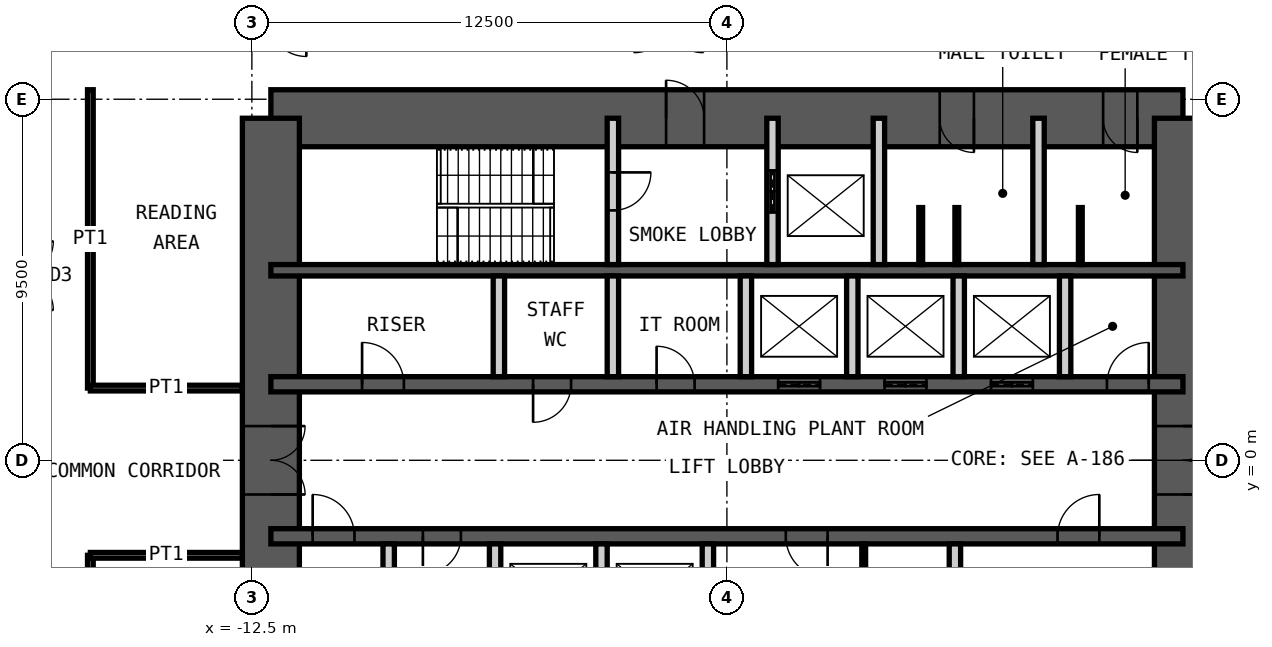
"""IFC4 building model, lengths in metres.
Left out: names, types, materials, properties, quantities, classifications, styles, units other than length and angle.
Written with IfcOpenShell. Run it as: python <this file> out.ifc"""

import sys

from ifc_helpers import new_model, si_unit, direction, frame, frame_2d, origin, place, context, subcontext, project, spatial, rectangle, extrude, element, fill, save


model = new_model("IFC4")
c1 = context("Model", 3, precision=1e-05, world=origin(), true_north=direction((0.0, 1.0)))
c2 = subcontext(c1, "Body", "Model", "MODEL_VIEW")
j1 = project(units=[si_unit("LENGTHUNIT", "METRE"), si_unit("PLANEANGLEUNIT", "RADIAN")], contexts=[c1])
p1 = place(None, origin())
s1 = spatial("IfcSite", under=j1, at=p1, CompositionType="ELEMENT")
p2 = place(p1, origin())
s2 = spatial("IfcBuilding", under=s1, at=p2, CompositionType="ELEMENT")
p3 = place(p2, frame((0.0, 0.0, 119.8)))
s3 = spatial("IfcBuildingStorey", under=s2, at=p3, CompositionType="ELEMENT", Elevation=119.8)
p4 = place(p3, frame((-12.0, 9.0, 0.0), z_axis=(0.0, 0.0, 1.0), x_axis=(1.0, 0.0, 0.0)))
e1 = element("IfcWall", 1, at=p4, inside=s3, PredefinedType="SHEAR", context=c2, shape_type="SweptSolid", body=[
    extrude(rectangle(XDim=24.0, YDim=1.5, at=frame_2d((12.0, 0.0))), origin(), (0.0, 0.0, 1.0), 4.2),
])
p5 = place(p4, frame((10.4, 0.0, 0.0)))
e2 = element("IfcOpeningElement", 2, at=p5, cuts=e1, PredefinedType="OPENING", context=c2, shape_type="SweptSolid", body=[
    extrude(rectangle(XDim=1.0, YDim=2.1, at=frame_2d((0.5, 1.05))), frame((0.0, 0.76, 0.0), z_axis=(0.0, -1.0, 0.0), x_axis=(1.0, 0.0, 0.0)), (0.0, 0.0, 1.0), 1.52),
])
p6 = place(p4, frame((17.6, 0.0, 0.0)))
e3 = element("IfcOpeningElement", 3, at=p6, cuts=e1, PredefinedType="OPENING", context=c2, shape_type="SweptSolid", body=[
    extrude(rectangle(XDim=0.9, YDim=2.1, at=frame_2d((0.45, 1.05))), frame((0.0, 0.76, 0.0), z_axis=(0.0, -1.0, 0.0), x_axis=(1.0, 0.0, 0.0)), (0.0, 0.0, 1.0), 1.52),
])
p7 = place(p4, frame((21.9, 0.0, 0.0)))
e4 = element("IfcOpeningElement", 4, at=p7, cuts=e1, PredefinedType="OPENING", context=c2, shape_type="SweptSolid", body=[
    extrude(rectangle(XDim=0.9, YDim=2.1, at=frame_2d((0.45, 1.05))), frame((0.0, 0.76, 0.0), z_axis=(0.0, -1.0, 0.0), x_axis=(1.0, 0.0, 0.0)), (0.0, 0.0, 1.0), 1.52),
])
p8 = place(p3, frame((12.0, -9.0, 0.0), z_axis=(0.0, 0.0, 1.0), x_axis=(0.0, 1.0, 0.0)))
e5 = element("IfcWall", 5, at=p8, inside=s3, PredefinedType="SHEAR", context=c2, shape_type="SweptSolid", body=[
    extrude(rectangle(XDim=18.0, YDim=1.5, at=frame_2d((9.0, 0.0))), origin(), (0.0, 0.0, 1.0), 4.2),
])
p9 = place(p8, frame((8.1, 0.0, 0.0)))
e6 = element("IfcOpeningElement", 6, at=p9, cuts=e5, PredefinedType="OPENING", context=c2, shape_type="SweptSolid", body=[
    extrude(rectangle(XDim=1.8, YDim=2.1, at=frame_2d((0.9, 1.05))), frame((0.0, 0.76, 0.0), z_axis=(0.0, -1.0, 0.0), x_axis=(1.0, 0.0, 0.0)), (0.0, 0.0, 1.0), 1.52),
])
p10 = place(p3, frame((-12.0, -9.0, 0.0), z_axis=(0.0, 0.0, 1.0), x_axis=(0.0, 1.0, 0.0)))
e7 = element("IfcWall", 7, at=p10, inside=s3, PredefinedType="SHEAR", context=c2, shape_type="SweptSolid", body=[
    extrude(rectangle(XDim=18.0, YDim=1.5, at=frame_2d((9.0, 0.0))), origin(), (0.0, 0.0, 1.0), 4.2),
])
p11 = place(p10, frame((8.1, 0.0, 0.0)))
e8 = element("IfcOpeningElement", 8, at=p11, cuts=e7, PredefinedType="OPENING", context=c2, shape_type="SweptSolid", body=[
    extrude(rectangle(XDim=1.8, YDim=2.1, at=frame_2d((0.9, 1.05))), frame((0.0, 0.76, 0.0), z_axis=(0.0, -1.0, 0.0), x_axis=(1.0, 0.0, 0.0)), (0.0, 0.0, 1.0), 1.52),
])
p12 = place(p3, frame((-12.0, 5.0, 0.0), z_axis=(0.0, 0.0, 1.0), x_axis=(1.0, 0.0, 0.0)))
e9 = element("IfcWall", 9, at=p12, inside=s3, PredefinedType="SHEAR", context=c2, shape_type="SweptSolid", body=[
    extrude(rectangle(XDim=24.0, YDim=0.3, at=frame_2d((12.0, 0.0))), origin(), (0.0, 0.0, 1.0), 4.2),
])
p13 = place(p3, frame((-12.0, 2.0, 0.0), z_axis=(0.0, 0.0, 1.0), x_axis=(1.0, 0.0, 0.0)))
e10 = element("IfcWall", 10, at=p13, inside=s3, PredefinedType="SHEAR", context=c2, shape_type="SweptSolid", body=[
    extrude(rectangle(XDim=24.0, YDim=0.4, at=frame_2d((12.0, 0.0))), origin(), (0.0, 0.0, 1.0), 4.2),
])
p14 = place(p13, frame((2.4, 0.0, 0.0)))
e11 = element("IfcOpeningElement", 11, at=p14, cuts=e10, PredefinedType="OPENING", context=c2, shape_type="SweptSolid", body=[
    extrude(rectangle(XDim=1.1, YDim=2.1, at=frame_2d((0.55, 1.05))), frame((0.0, 0.21, 0.0), z_axis=(0.0, -1.0, 0.0), x_axis=(1.0, 0.0, 0.0)), (0.0, 0.0, 1.0), 0.42),
])
p15 = place(p13, frame((22.0, 0.0, 0.0)))
e12 = element("IfcOpeningElement", 12, at=p15, cuts=e10, PredefinedType="OPENING", context=c2, shape_type="SweptSolid", body=[
    extrude(rectangle(XDim=1.1, YDim=2.1, at=frame_2d((0.55, 1.05))), frame((0.0, 0.21, 0.0), z_axis=(0.0, -1.0, 0.0), x_axis=(1.0, 0.0, 0.0)), (0.0, 0.0, 1.0), 0.42),
])
p16 = place(p13, frame((10.15, 0.0, 0.0)))
e13 = element("IfcOpeningElement", 13, at=p16, cuts=e10, PredefinedType="OPENING", context=c2, shape_type="SweptSolid", body=[
    extrude(rectangle(XDim=1.0, YDim=2.1, at=frame_2d((0.5, 1.05))), frame((0.0, 0.21, 0.0), z_axis=(0.0, -1.0, 0.0), x_axis=(1.0, 0.0, 0.0)), (0.0, 0.0, 1.0), 0.42),
])
p17 = place(p13, frame((6.9, 0.0, 0.0)))
e14 = element("IfcOpeningElement", 14, at=p17, cuts=e10, PredefinedType="OPENING", context=c2, shape_type="SweptSolid", body=[
    extrude(rectangle(XDim=1.0, YDim=2.1, at=frame_2d((0.5, 1.05))), frame((0.0, 0.21, 0.0), z_axis=(0.0, -1.0, 0.0), x_axis=(1.0, 0.0, 0.0)), (0.0, 0.0, 1.0), 0.42),
])
p18 = place(p13, frame((13.35, 0.0, 0.0)))
e15 = element("IfcOpeningElement", 15, at=p18, cuts=e10, PredefinedType="OPENING", context=c2, shape_type="SweptSolid", body=[
    extrude(rectangle(XDim=1.1, YDim=2.4, at=frame_2d((0.55, 1.2))), frame((0.0, 0.21, 0.0), z_axis=(0.0, -1.0, 0.0), x_axis=(1.0, 0.0, 0.0)), (0.0, 0.0, 1.0), 0.42),
])
p19 = place(p13, frame((16.15, 0.0, 0.0)))
e16 = element("IfcOpeningElement", 16, at=p19, cuts=e10, PredefinedType="OPENING", context=c2, shape_type="SweptSolid", body=[
    extrude(rectangle(XDim=1.1, YDim=2.4, at=frame_2d((0.55, 1.2))), frame((0.0, 0.21, 0.0), z_axis=(0.0, -1.0, 0.0), x_axis=(1.0, 0.0, 0.0)), (0.0, 0.0, 1.0), 0.42),
])
p20 = place(p13, frame((18.95, 0.0, 0.0)))
e17 = element("IfcOpeningElement", 17, at=p20, cuts=e10, PredefinedType="OPENING", context=c2, shape_type="SweptSolid", body=[
    extrude(rectangle(XDim=1.1, YDim=2.4, at=frame_2d((0.55, 1.2))), frame((0.0, 0.21, 0.0), z_axis=(0.0, -1.0, 0.0), x_axis=(1.0, 0.0, 0.0)), (0.0, 0.0, 1.0), 0.42),
])
p21 = place(p3, frame((-12.0, -2.0, 0.0), z_axis=(0.0, 0.0, 1.0), x_axis=(1.0, 0.0, 0.0)))
e18 = element("IfcWall", 18, at=p21, inside=s3, PredefinedType="SHEAR", context=c2, shape_type="SweptSolid", body=[
    extrude(rectangle(XDim=24.0, YDim=0.4, at=frame_2d((12.0, 0.0))), origin(), (0.0, 0.0, 1.0), 4.2),
])
p22 = place(p21, frame((1.1, 0.0, 0.0)))
e19 = element("IfcOpeningElement", 19, at=p22, cuts=e18, PredefinedType="OPENING", context=c2, shape_type="SweptSolid", body=[
    extrude(rectangle(XDim=1.1, YDim=2.1, at=frame_2d((0.55, 1.05))), frame((0.0, 0.21, 0.0), z_axis=(0.0, -1.0, 0.0), x_axis=(1.0, 0.0, 0.0)), (0.0, 0.0, 1.0), 0.42),
])
p23 = place(p21, frame((13.55, 0.0, 0.0)))
e20 = element("IfcOpeningElement", 20, at=p23, cuts=e18, PredefinedType="OPENING", context=c2, shape_type="SweptSolid", body=[
    extrude(rectangle(XDim=1.1, YDim=2.1, at=frame_2d((0.55, 1.05))), frame((0.0, 0.21, 0.0), z_axis=(0.0, -1.0, 0.0), x_axis=(1.0, 0.0, 0.0)), (0.0, 0.0, 1.0), 0.42),
])
p24 = place(p21, frame((20.7, 0.0, 0.0)))
e21 = element("IfcOpeningElement", 21, at=p24, cuts=e18, PredefinedType="OPENING", context=c2, shape_type="SweptSolid", body=[
    extrude(rectangle(XDim=1.1, YDim=2.1, at=frame_2d((0.55, 1.05))), frame((0.0, 0.21, 0.0), z_axis=(0.0, -1.0, 0.0), x_axis=(1.0, 0.0, 0.0)), (0.0, 0.0, 1.0), 0.42),
])
p25 = place(p21, frame((4.0, 0.0, 0.0)))
e22 = element("IfcOpeningElement", 22, at=p25, cuts=e18, PredefinedType="OPENING", context=c2, shape_type="SweptSolid", body=[
    extrude(rectangle(XDim=1.0, YDim=2.1, at=frame_2d((0.5, 1.05))), frame((0.0, 0.21, 0.0), z_axis=(0.0, -1.0, 0.0), x_axis=(1.0, 0.0, 0.0)), (0.0, 0.0, 1.0), 0.42),
])
p26 = place(p3, frame((-3.0, 5.15, 0.0), z_axis=(0.0, 0.0, 1.0), x_axis=(0.0, 1.0, 0.0)))
e23 = element("IfcWall", 23, at=p26, inside=s3, PredefinedType="PARTITIONING", context=c2, shape_type="SweptSolid", body=[
    extrude(rectangle(XDim=3.85, YDim=0.3, at=frame_2d((1.925, 0.0))), origin(), (0.0, 0.0, 1.0), 3.98),
])
p27 = place(p26, frame((1.425, 0.0, 0.0)))
e24 = element("IfcOpeningElement", 24, at=p27, cuts=e23, PredefinedType="OPENING", context=c2, shape_type="SweptSolid", body=[
    extrude(rectangle(XDim=1.0, YDim=2.1, at=frame_2d((0.5, 1.05))), frame((0.0, 0.16, 0.0), z_axis=(0.0, -1.0, 0.0), x_axis=(1.0, 0.0, 0.0)), (0.0, 0.0, 1.0), 0.32),
])
p28 = place(p3, frame((1.2, 5.15, 0.0), z_axis=(0.0, 0.0, 1.0), x_axis=(0.0, 1.0, 0.0)))
e25 = element("IfcWall", 25, at=p28, inside=s3, PredefinedType="PARTITIONING", context=c2, shape_type="SweptSolid", body=[
    extrude(rectangle(XDim=3.85, YDim=0.3, at=frame_2d((1.925, 0.0))), origin(), (0.0, 0.0, 1.0), 3.98),
])
p29 = place(p28, frame((1.375, 0.0, 0.0)))
e26 = element("IfcOpeningElement", 26, at=p29, cuts=e25, PredefinedType="OPENING", context=c2, shape_type="SweptSolid", body=[
    extrude(rectangle(XDim=1.1, YDim=2.4, at=frame_2d((0.55, 1.2))), frame((0.0, 0.16, 0.0), z_axis=(0.0, -1.0, 0.0), x_axis=(1.0, 0.0, 0.0)), (0.0, 0.0, 1.0), 0.32),
])
for number, where, z_axis, x_axis in (
    (27, (4.0, 5.15, 0.0), (0.0, 0.0, 1.0), (0.0, 1.0, 0.0)),
    (28, (8.2, 5.15, 0.0), (0.0, 0.0, 1.0), (0.0, 1.0, 0.0)),
):
    element("IfcWall", number, at=place(p3, frame(where, z_axis=z_axis, x_axis=x_axis)), inside=s3, PredefinedType="PARTITIONING", context=c2, shape_type="SweptSolid", body=[
        extrude(rectangle(XDim=3.85, YDim=0.3, at=frame_2d((1.925, 0.0))), origin(), (0.0, 0.0, 1.0), 3.98),
    ])
for number, where, z_axis, x_axis in (
    (29, (-6.0, 2.2, 0.0), (0.0, 0.0, 1.0), (0.0, 1.0, 0.0)),
    (30, (-3.0, 2.2, 0.0), (0.0, 0.0, 1.0), (0.0, 1.0, 0.0)),
    (31, (0.5, 2.2, 0.0), (0.0, 0.0, 1.0), (0.0, 1.0, 0.0)),
    (32, (3.3, 2.2, 0.0), (0.0, 0.0, 1.0), (0.0, 1.0, 0.0)),
    (33, (6.1, 2.2, 0.0), (0.0, 0.0, 1.0), (0.0, 1.0, 0.0)),
    (34, (8.9, 2.2, 0.0), (0.0, 0.0, 1.0), (0.0, 1.0, 0.0)),
    (35, (-8.9, -4.85, 0.0), (0.0, 0.0, 1.0), (0.0, 1.0, 0.0)),
    (36, (-6.1, -4.85, 0.0), (0.0, 0.0, 1.0), (0.0, 1.0, 0.0)),
    (37, (-3.3, -4.85, 0.0), (0.0, 0.0, 1.0), (0.0, 1.0, 0.0)),
    (38, (-0.5, -4.85, 0.0), (0.0, 0.0, 1.0), (0.0, 1.0, 0.0)),
    (39, (6.0, -4.85, 0.0), (0.0, 0.0, 1.0), (0.0, 1.0, 0.0)),
):
    element("IfcWall", number, at=place(p3, frame(where, z_axis=z_axis, x_axis=x_axis)), inside=s3, PredefinedType="PARTITIONING", context=c2, shape_type="SweptSolid", body=[
        extrude(rectangle(XDim=2.65, YDim=0.3, at=frame_2d((1.325, 0.0))), origin(), (0.0, 0.0, 1.0), 3.98),
    ])
p30 = place(p3, frame((3.6, -4.85, 0.0), z_axis=(0.0, 0.0, 1.0), x_axis=(0.0, 1.0, 0.0)))
e40 = element("IfcWall", 40, at=p30, inside=s3, PredefinedType="PARTITIONING", context=c2, shape_type="SweptSolid", body=[
    extrude(rectangle(XDim=2.65, YDim=0.1, at=frame_2d((1.325, 0.0))), origin(), (0.0, 0.0, 1.0), 3.98),
])
p31 = place(p30, frame((0.1, 0.0, 0.0)))
e41 = element("IfcOpeningElement", 41, at=p31, cuts=e40, PredefinedType="OPENING", context=c2, shape_type="SweptSolid", body=[
    extrude(rectangle(XDim=1.0, YDim=2.4, at=frame_2d((0.5, 1.2))), frame((0.0, 0.06, 0.0), z_axis=(0.0, -1.0, 0.0), x_axis=(1.0, 0.0, 0.0)), (0.0, 0.0, 1.0), 0.12),
])
for number, where, z_axis, x_axis in (
    (42, (5.1, 5.15, 0.0), (0.0, 0.0, 1.0), (0.0, 1.0, 0.0)),
    (43, (6.05, 5.15, 0.0), (0.0, 0.0, 1.0), (0.0, 1.0, 0.0)),
    (44, (9.3, 5.15, 0.0), (0.0, 0.0, 1.0), (0.0, 1.0, 0.0)),
):
    element("IfcWall", number, at=place(p3, frame(where, z_axis=z_axis, x_axis=x_axis)), inside=s3, PredefinedType="PARTITIONING", context=c2, shape_type="SweptSolid", body=[
        extrude(rectangle(XDim=1.5, YDim=0.1, at=frame_2d((0.75, 0.0))), origin(), (0.0, 0.0, 1.0), 2.1),
    ])
p32 = place(p3, frame((-16.75, 1.9, 0.0), z_axis=(0.0, 0.0, 1.0), x_axis=(0.0, 1.0, 0.0)))
e45 = element("IfcWall", 45, at=p32, inside=s3, PredefinedType="PARTITIONING", context=c2, shape_type="SweptSolid", body=[
    extrude(rectangle(XDim=7.85, YDim=0.15, at=frame_2d((3.925, 0.0))), origin(), (0.0, 0.0, 1.0), 4.03),
])
p33 = place(p3, frame((-12.75, 1.9, 0.0), z_axis=(0.0, 0.0, 1.0), x_axis=(-1.0, 0.0, 0.0)))
e46 = element("IfcWall", 46, at=p33, inside=s3, PredefinedType="PARTITIONING", context=c2, shape_type="SweptSolid", body=[
    extrude(rectangle(XDim=4.0, YDim=0.15, at=frame_2d((2.0, 0.0))), origin(), (0.0, 0.0, 1.0), 3.33),
])
p34 = place(p3, frame((-16.75, -9.75, 0.0), z_axis=(0.0, 0.0, 1.0), x_axis=(0.0, 1.0, 0.0)))
e47 = element("IfcWall", 47, at=p34, inside=s3, PredefinedType="PARTITIONING", context=c2, shape_type="SweptSolid", body=[
    extrude(rectangle(XDim=7.25, YDim=0.15, at=frame_2d((3.625, 0.0))), origin(), (0.0, 0.0, 1.0), 4.03),
])
p35 = place(p3, frame((-12.75, -2.5, 0.0), z_axis=(0.0, 0.0, 1.0), x_axis=(-1.0, 0.0, 0.0)))
e48 = element("IfcWall", 48, at=p35, inside=s3, PredefinedType="PARTITIONING", context=c2, shape_type="SweptSolid", body=[
    extrude(rectangle(XDim=4.0, YDim=0.15, at=frame_2d((2.0, 0.0))), origin(), (0.0, 0.0, 1.0), 3.33),
])
p36 = place(p5, origin())
e49 = element("IfcDoor", 49, at=p36, inside=s3, OperationType="SINGLE_SWING_RIGHT", PredefinedType="DOOR", context=c2, shape_type="SweptSolid", body=[
    extrude(rectangle(XDim=1.0, YDim=2.1, at=frame_2d((0.5, 1.05))), frame((0.0, 0.025, 0.0), z_axis=(0.0, -1.0, 0.0), x_axis=(1.0, 0.0, 0.0)), (0.0, 0.0, 1.0), 0.05),
])
fill(e2, e49)
p37 = place(p6, origin())
e50 = element("IfcDoor", 50, at=p37, inside=s3, OperationType="SINGLE_SWING_RIGHT", PredefinedType="DOOR", context=c2, shape_type="SweptSolid", body=[
    extrude(rectangle(XDim=0.9, YDim=2.1, at=frame_2d((0.45, 1.05))), frame((0.0, 0.025, 0.0), z_axis=(0.0, -1.0, 0.0), x_axis=(1.0, 0.0, 0.0)), (0.0, 0.0, 1.0), 0.05),
])
fill(e3, e50)
p38 = place(p7, origin())
e51 = element("IfcDoor", 51, at=p38, inside=s3, OperationType="SINGLE_SWING_RIGHT", PredefinedType="DOOR", context=c2, shape_type="SweptSolid", body=[
    extrude(rectangle(XDim=0.9, YDim=2.1, at=frame_2d((0.45, 1.05))), frame((0.0, 0.025, 0.0), z_axis=(0.0, -1.0, 0.0), x_axis=(1.0, 0.0, 0.0)), (0.0, 0.0, 1.0), 0.05),
])
fill(e4, e51)
p39 = place(p27, origin())
e52 = element("IfcDoor", 52, at=p39, inside=s3, OperationType="SINGLE_SWING_RIGHT", PredefinedType="DOOR", context=c2, shape_type="SweptSolid", body=[
    extrude(rectangle(XDim=1.0, YDim=2.1, at=frame_2d((0.5, 1.05))), frame((0.0, 0.025, 0.0), z_axis=(0.0, -1.0, 0.0), x_axis=(1.0, 0.0, 0.0)), (0.0, 0.0, 1.0), 0.05),
])
fill(e24, e52)
p40 = place(p14, origin())
e53 = element("IfcDoor", 53, at=p40, inside=s3, OperationType="SINGLE_SWING_RIGHT", PredefinedType="DOOR", context=c2, shape_type="SweptSolid", body=[
    extrude(rectangle(XDim=1.1, YDim=2.1, at=frame_2d((0.55, 1.05))), frame((0.0, 0.025, 0.0), z_axis=(0.0, -1.0, 0.0), x_axis=(1.0, 0.0, 0.0)), (0.0, 0.0, 1.0), 0.05),
])
fill(e11, e53)
p41 = place(p22, origin())
e54 = element("IfcDoor", 54, at=p41, inside=s3, OperationType="SINGLE_SWING_RIGHT", PredefinedType="DOOR", context=c2, shape_type="SweptSolid", body=[
    extrude(rectangle(XDim=1.1, YDim=2.1, at=frame_2d((0.55, 1.05))), frame((0.0, 0.025, 0.0), z_axis=(0.0, -1.0, 0.0), x_axis=(1.0, 0.0, 0.0)), (0.0, 0.0, 1.0), 0.05),
])
fill(e19, e54)
p42 = place(p15, origin())
e55 = element("IfcDoor", 55, at=p42, inside=s3, OperationType="SINGLE_SWING_LEFT", PredefinedType="DOOR", context=c2, shape_type="SweptSolid", body=[
    extrude(rectangle(XDim=1.1, YDim=2.1, at=frame_2d((0.55, 1.05))), frame((0.0, 0.025, 0.0), z_axis=(0.0, -1.0, 0.0), x_axis=(1.0, 0.0, 0.0)), (0.0, 0.0, 1.0), 0.05),
])
fill(e12, e55)
p43 = place(p16, origin())
e56 = element("IfcDoor", 56, at=p43, inside=s3, OperationType="SINGLE_SWING_RIGHT", PredefinedType="DOOR", context=c2, shape_type="SweptSolid", body=[
    extrude(rectangle(XDim=1.0, YDim=2.1, at=frame_2d((0.5, 1.05))), frame((0.0, 0.025, 0.0), z_axis=(0.0, -1.0, 0.0), x_axis=(1.0, 0.0, 0.0)), (0.0, 0.0, 1.0), 0.05),
])
fill(e13, e56)
p44 = place(p23, origin())
e57 = element("IfcDoor", 57, at=p44, inside=s3, OperationType="SINGLE_SWING_RIGHT", PredefinedType="DOOR", context=c2, shape_type="SweptSolid", body=[
    extrude(rectangle(XDim=1.1, YDim=2.1, at=frame_2d((0.55, 1.05))), frame((0.0, 0.025, 0.0), z_axis=(0.0, -1.0, 0.0), x_axis=(1.0, 0.0, 0.0)), (0.0, 0.0, 1.0), 0.05),
])
fill(e20, e57)
p45 = place(p24, origin())
e58 = element("IfcDoor", 58, at=p45, inside=s3, OperationType="SINGLE_SWING_LEFT", PredefinedType="DOOR", context=c2, shape_type="SweptSolid", body=[
    extrude(rectangle(XDim=1.1, YDim=2.1, at=frame_2d((0.55, 1.05))), frame((0.0, 0.025, 0.0), z_axis=(0.0, -1.0, 0.0), x_axis=(1.0, 0.0, 0.0)), (0.0, 0.0, 1.0), 0.05),
])
fill(e21, e58)
p46 = place(p9, origin())
e59 = element("IfcDoor", 59, at=p46, inside=s3, OperationType="DOUBLE_DOOR_DOUBLE_SWING", PredefinedType="DOOR", context=c2, shape_type="SweptSolid", body=[
    extrude(rectangle(XDim=1.8, YDim=2.1, at=frame_2d((0.9, 1.05))), frame((0.0, 0.025, 0.0), z_axis=(0.0, -1.0, 0.0), x_axis=(1.0, 0.0, 0.0)), (0.0, 0.0, 1.0), 0.05),
])
fill(e6, e59)
p47 = place(p11, origin())
e60 = element("IfcDoor", 60, at=p47, inside=s3, OperationType="DOUBLE_DOOR_DOUBLE_SWING", PredefinedType="DOOR", context=c2, shape_type="SweptSolid", body=[
    extrude(rectangle(XDim=1.8, YDim=2.1, at=frame_2d((0.9, 1.05))), frame((0.0, 0.025, 0.0), z_axis=(0.0, -1.0, 0.0), x_axis=(1.0, 0.0, 0.0)), (0.0, 0.0, 1.0), 0.05),
])
fill(e8, e60)
p48 = place(p29, origin())
e61 = element("IfcDoor", 61, at=p48, inside=s3, OperationType="DOUBLE_DOOR_SLIDING", PredefinedType="DOOR", context=c2, shape_type="SweptSolid", body=[
    extrude(rectangle(XDim=1.1, YDim=2.4, at=frame_2d((0.55, 1.2))), frame((0.0, 0.025, 0.0), z_axis=(0.0, -1.0, 0.0), x_axis=(1.0, 0.0, 0.0)), (0.0, 0.0, 1.0), 0.05),
])
fill(e26, e61)
p49 = place(p17, origin())
e62 = element("IfcDoor", 62, at=p49, inside=s3, OperationType="SINGLE_SWING_LEFT", PredefinedType="DOOR", context=c2, shape_type="SweptSolid", body=[
    extrude(rectangle(XDim=1.0, YDim=2.1, at=frame_2d((0.5, 1.05))), frame((0.0, 0.025, 0.0), z_axis=(0.0, -1.0, 0.0), x_axis=(1.0, 0.0, 0.0)), (0.0, 0.0, 1.0), 0.05),
])
fill(e14, e62)
p50 = place(p18, origin())
e63 = element("IfcDoor", 63, at=p50, inside=s3, OperationType="DOUBLE_DOOR_SLIDING", PredefinedType="DOOR", context=c2, shape_type="SweptSolid", body=[
    extrude(rectangle(XDim=1.1, YDim=2.4, at=frame_2d((0.55, 1.2))), frame((0.0, 0.025, 0.0), z_axis=(0.0, -1.0, 0.0), x_axis=(1.0, 0.0, 0.0)), (0.0, 0.0, 1.0), 0.05),
])
fill(e15, e63)
p51 = place(p19, origin())
e64 = element("IfcDoor", 64, at=p51, inside=s3, OperationType="DOUBLE_DOOR_SLIDING", PredefinedType="DOOR", context=c2, shape_type="SweptSolid", body=[
    extrude(rectangle(XDim=1.1, YDim=2.4, at=frame_2d((0.55, 1.2))), frame((0.0, 0.025, 0.0), z_axis=(0.0, -1.0, 0.0), x_axis=(1.0, 0.0, 0.0)), (0.0, 0.0, 1.0), 0.05),
])
fill(e16, e64)
p52 = place(p20, origin())
e65 = element("IfcDoor", 65, at=p52, inside=s3, OperationType="DOUBLE_DOOR_SLIDING", PredefinedType="DOOR", context=c2, shape_type="SweptSolid", body=[
    extrude(rectangle(XDim=1.1, YDim=2.4, at=frame_2d((0.55, 1.2))), frame((0.0, 0.025, 0.0), z_axis=(0.0, -1.0, 0.0), x_axis=(1.0, 0.0, 0.0)), (0.0, 0.0, 1.0), 0.05),
])
fill(e17, e65)
p53 = place(p25, origin())
e66 = element("IfcDoor", 66, at=p53, inside=s3, OperationType="SINGLE_SWING_LEFT", PredefinedType="DOOR", context=c2, shape_type="SweptSolid", body=[
    extrude(rectangle(XDim=1.0, YDim=2.1, at=frame_2d((0.5, 1.05))), frame((0.0, 0.025, 0.0), z_axis=(0.0, -1.0, 0.0), x_axis=(1.0, 0.0, 0.0)), (0.0, 0.0, 1.0), 0.05),
])
fill(e22, e66)
save(model, sys.argv[1])
